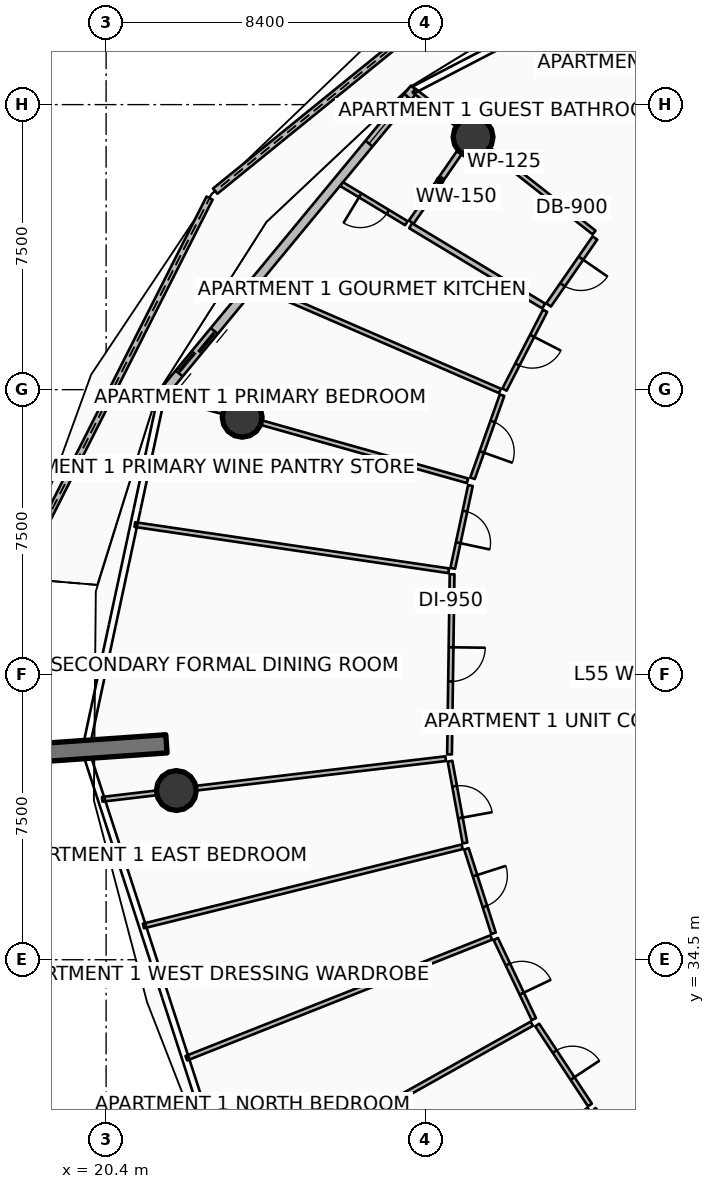
"""IFC4 building model, lengths in metres.
Left out: names, types, materials, properties, quantities, classifications, styles, units other than length and angle.
Written with IfcOpenShell. Run it as: python <this file> out.ifc"""

import sys

from ifc_helpers import new_model, si_unit, direction, frame, frame_2d, origin, origin_2d, place, context, subcontext, project, spatial, polyline, rectangle, circle, outline, extrude, element, fill, save


model = new_model("IFC4")
c1 = context("Model", 3, precision=1e-05, world=origin(), true_north=direction((0.0, 1.0)))
c2 = subcontext(c1, "Body", "Model", "MODEL_VIEW")
j1 = project(units=[si_unit("LENGTHUNIT", "METRE"), si_unit("PLANEANGLEUNIT", "RADIAN")], contexts=[c1])
p1 = place(None, origin())
s1 = spatial("IfcSite", under=j1, at=p1, CompositionType="ELEMENT")
p2 = place(p1, origin())
s2 = spatial("IfcBuilding", under=s1, at=p2, CompositionType="ELEMENT")
p3 = place(p2, frame((0.0, 0.0, 217.8)))
s3 = spatial("IfcBuildingStorey", under=s2, at=p3, CompositionType="ELEMENT", Elevation=217.8)
p4 = place(p3, frame((21.987, 40.181, 0.0), z_axis=(0.0, 0.0, 1.0), x_axis=(-0.997568676264, -0.069690287244, 0.0)))
e1 = element("IfcWall", 1, at=p4, inside=s3, PredefinedType="SOLIDWALL", context=c2, shape_type="SweptSolid", body=[
    extrude(rectangle(XDim=3.5, YDim=0.48, at=frame_2d((1.75, 0.0))), origin(), (0.0, 0.0, 1.0), 3.75),
])
for number, where, z_axis, x_axis in (
    (2, (30.056, 56.146, 0.0), (0.0, 0.0, 1.0), (1.0, 0.0, 0.0)),
    (3, (23.98, 48.774, 0.0), (0.0, 0.0, 1.0), (1.0, 0.0, 0.0)),
    (4, (22.248, 38.952, 0.0), (0.0, 0.0, 1.0), (1.0, 0.0, 0.0)),
):
    element("IfcColumn", number, at=place(p3, frame(where, z_axis=z_axis, x_axis=x_axis)), inside=s3, PredefinedType="COLUMN", context=c2, shape_type="SweptSolid", body=[
        extrude(circle(Radius=0.525, at=origin_2d()), origin(), (0.0, 0.0, 1.0), 3.5),
    ])
p5 = place(p3, frame((31.337, 61.271, 0.0), z_axis=(0.0, 0.0, 1.0), x_axis=(-0.776456761235, -0.630170530834, 0.0)))
e5 = element("IfcWall", 5, at=p5, inside=s3, PredefinedType="PARAPET", context=c2, shape_type="SweptSolid", body=[
    extrude(outline(polyline([(0.0, 0.0), (10.389, 0.0), (10.389, 1.148), (5.195, 1.127), (0.0, 1.224), (0.0, 0.0)])), frame((0.0, 0.09, 0.0), z_axis=(0.0, -1.0, 0.0), x_axis=(1.0, 0.0, 0.0)), (0.0, 0.0, 1.0), 0.18),
])
p6 = place(p3, frame((23.123, 54.541, 0.0), z_axis=(0.0, 0.0, 1.0), x_axis=(-0.451373731974, -0.892335001042, 0.0)))
e6 = element("IfcWall", 6, at=p6, inside=s3, PredefinedType="PARAPET", context=c2, shape_type="SweptSolid", body=[
    extrude(outline(polyline([(0.0, 0.0), (11.208, 0.0), (11.208, 1.483), (5.604, 1.284), (0.0, 1.148), (0.0, 0.0)])), frame((0.0, 0.09, 0.0), z_axis=(0.0, -1.0, 0.0), x_axis=(1.0, 0.0, 0.0)), (0.0, 0.0, 1.0), 0.18),
])
p7 = place(p3, frame((28.515, 57.424, 0.0), z_axis=(0.0, 0.0, 1.0), x_axis=(-0.636759394418, -0.771062561418, 0.0)))
e7 = element("IfcWall", 7, at=p7, inside=s3, PredefinedType="SOLIDWALL", context=c2, shape_type="SweptSolid", body=[
    extrude(rectangle(XDim=10.494, YDim=0.24, at=frame_2d((5.247, 0.0))), origin(), (0.0, 0.0, 1.0), 2.45),
])
p8 = place(p7, frame((8.274, 0.0, 0.0)))
e8 = element("IfcOpeningElement", 8, at=p8, cuts=e7, PredefinedType="OPENING", context=c2, shape_type="SweptSolid", body=[
    extrude(rectangle(XDim=1.45, YDim=2.15, at=frame_2d((0.725, 1.075))), frame((0.0, 0.13, 0.0), z_axis=(0.0, -1.0, 0.0), x_axis=(1.0, 0.0, 0.0)), (0.0, 0.0, 1.0), 0.26),
])
p9 = place(p7, frame((0.28, 0.0, 0.65)))
e9 = element("IfcOpeningElement", 9, at=p9, cuts=e7, PredefinedType="OPENING", context=c2, shape_type="SweptSolid", body=[
    extrude(rectangle(XDim=1.6, YDim=1.5, at=frame_2d((0.8, 0.75))), frame((0.0, 0.13, 0.0), z_axis=(0.0, -1.0, 0.0), x_axis=(1.0, 0.0, 0.0)), (0.0, 0.0, 1.0), 0.26),
])
p10 = place(p3, frame((41.113, 33.264, 0.0), z_axis=(0.0, 0.0, 1.0), x_axis=(-0.619089233189, -0.785320648748, 0.0)))
e10 = element("IfcWall", 10, at=p10, inside=s3, PredefinedType="PARTITIONING", context=c2, shape_type="SweptSolid", body=[
    extrude(rectangle(XDim=16.006, YDim=0.18, at=frame_2d((8.003, 0.0))), origin(), (0.0, 0.0, 1.0), 2.94),
])
p11 = place(p3, frame((33.241, 53.635, 0.0), z_axis=(0.0, 0.0, 1.0), x_axis=(-0.785321754625, 0.619087830371, 0.0)))
e11 = element("IfcWall", 11, at=p11, inside=s3, PredefinedType="PARTITIONING", context=c2, shape_type="SweptSolid", body=[
    extrude(rectangle(XDim=6.033, YDim=0.125, at=frame_2d((3.017, 0.0))), origin(), (0.0, 0.0, 1.0), 2.94),
])
p12 = place(p3, frame((33.262, 53.491, 0.0), z_axis=(0.0, 0.0, 1.0), x_axis=(-0.568919673568, -0.822393096413, 0.0)))
e12 = element("IfcWall", 12, at=p12, inside=s3, PredefinedType="PARTITIONING", context=c2, shape_type="SweptSolid", body=[
    extrude(rectangle(XDim=2.143, YDim=0.15, at=frame_2d((1.072, 0.0))), origin(), (0.0, 0.0, 1.0), 2.94),
])
p13 = place(p12, frame((0.646, 0.0, 0.0)))
e13 = element("IfcOpeningElement", 13, at=p13, cuts=e12, PredefinedType="OPENING", context=c2, shape_type="SweptSolid", body=[
    extrude(rectangle(XDim=0.85, YDim=2.06, at=frame_2d((0.425, 1.03))), frame((0.0, 0.085, 0.0), z_axis=(0.0, -1.0, 0.0), x_axis=(1.0, 0.0, 0.0)), (0.0, 0.0, 1.0), 0.17),
])
p14 = place(p3, frame((29.948, 56.104, 0.0), z_axis=(0.0, 0.0, 1.0), x_axis=(-0.568843740651, -0.822445620526, 0.0)))
e14 = element("IfcWall", 14, at=p14, inside=s3, PredefinedType="PARTITIONING", context=c2, shape_type="SweptSolid", body=[
    extrude(rectangle(XDim=2.669, YDim=0.15, at=frame_2d((1.335, 0.0))), origin(), (0.0, 0.0, 1.0), 2.94),
])
p15 = place(p3, frame((31.915, 51.701, 0.0), z_axis=(0.0, 0.0, 1.0), x_axis=(-0.856305556185, 0.516469548422, 0.0)))
e15 = element("IfcWall", 15, at=p15, inside=s3, PredefinedType="PARTITIONING", context=c2, shape_type="SweptSolid", body=[
    extrude(rectangle(XDim=4.09, YDim=0.15, at=frame_2d((2.045, 0.0))), origin(), (0.0, 0.0, 1.0), 2.94),
])
p16 = place(p3, frame((28.302, 53.881, 0.0), z_axis=(0.0, 0.0, 1.0), x_axis=(-0.856354175531, 0.516388929056, 0.0)))
e16 = element("IfcWall", 16, at=p16, inside=s3, PredefinedType="PARTITIONING", context=c2, shape_type="SweptSolid", body=[
    extrude(rectangle(XDim=1.99, YDim=0.125, at=frame_2d((0.995, 0.0))), origin(), (0.0, 0.0, 1.0), 2.94),
])
p17 = place(p16, frame((0.57, 0.0, 0.0)))
e17 = element("IfcOpeningElement", 17, at=p17, cuts=e16, PredefinedType="OPENING", context=c2, shape_type="SweptSolid", body=[
    extrude(rectangle(XDim=0.85, YDim=2.06, at=frame_2d((0.425, 1.03))), frame((0.0, 0.073, 0.0), z_axis=(0.0, -1.0, 0.0), x_axis=(1.0, 0.0, 0.0)), (0.0, 0.0, 1.0), 0.145),
])
p18 = place(p3, frame((30.764, 49.467, 0.0), z_axis=(0.0, 0.0, 1.0), x_axis=(-0.917605566125, 0.397492169755, 0.0)))
e18 = element("IfcWall", 18, at=p18, inside=s3, PredefinedType="PARTITIONING", context=c2, shape_type="SweptSolid", body=[
    extrude(rectangle(XDim=6.955, YDim=0.125, at=frame_2d((3.477, 0.0))), origin(), (0.0, 0.0, 1.0), 2.94),
])
p19 = place(p3, frame((31.951, 51.575, 0.0), z_axis=(0.0, 0.0, 1.0), x_axis=(-0.458029312051, -0.88893708962, 0.0)))
e19 = element("IfcWall", 19, at=p19, inside=s3, PredefinedType="PARTITIONING", context=c2, shape_type="SweptSolid", body=[
    extrude(rectangle(XDim=2.332, YDim=0.125, at=frame_2d((1.166, 0.0))), origin(), (0.0, 0.0, 1.0), 2.94),
])
p20 = place(p19, frame((0.741, 0.0, 0.0)))
e20 = element("IfcOpeningElement", 20, at=p20, cuts=e19, PredefinedType="OPENING", context=c2, shape_type="SweptSolid", body=[
    extrude(rectangle(XDim=0.85, YDim=2.06, at=frame_2d((0.425, 1.03))), frame((0.0, 0.073, 0.0), z_axis=(0.0, -1.0, 0.0), x_axis=(1.0, 0.0, 0.0)), (0.0, 0.0, 1.0), 0.145),
])
p21 = place(p3, frame((30.82, 49.356, 0.0), z_axis=(0.0, 0.0, 1.0), x_axis=(-0.335156966619, -0.942162304344, 0.0)))
e21 = element("IfcWall", 21, at=p21, inside=s3, PredefinedType="PARTITIONING", context=c2, shape_type="SweptSolid", body=[
    extrude(rectangle(XDim=2.322, YDim=0.125, at=frame_2d((1.161, 0.0))), origin(), (0.0, 0.0, 1.0), 2.94),
])
p22 = place(p21, frame((0.736, 0.0, 0.0)))
e22 = element("IfcOpeningElement", 22, at=p22, cuts=e21, PredefinedType="OPENING", context=c2, shape_type="SweptSolid", body=[
    extrude(rectangle(XDim=0.85, YDim=2.06, at=frame_2d((0.425, 1.03))), frame((0.0, 0.073, 0.0), z_axis=(0.0, -1.0, 0.0), x_axis=(1.0, 0.0, 0.0)), (0.0, 0.0, 1.0), 0.145),
])
p23 = place(p3, frame((29.912, 47.101, 0.0), z_axis=(0.0, 0.0, 1.0), x_axis=(-0.962449080254, 0.271462277156, 0.0)))
e23 = element("IfcWall", 23, at=p23, inside=s3, PredefinedType="PARTITIONING", context=c2, shape_type="SweptSolid", body=[
    extrude(rectangle(XDim=8.236, YDim=0.125, at=frame_2d((4.118, 0.0))), origin(), (0.0, 0.0, 1.0), 2.94),
])
p24 = place(p3, frame((29.416, 44.734, 0.0), z_axis=(0.0, 0.0, 1.0), x_axis=(-0.989347742189, 0.145571443031, 0.0)))
e24 = element("IfcWall", 24, at=p24, inside=s3, PredefinedType="PARTITIONING", context=c2, shape_type="SweptSolid", body=[
    extrude(rectangle(XDim=8.349, YDim=0.125, at=frame_2d((4.174, 0.0))), origin(), (0.0, 0.0, 1.0), 2.94),
])
p25 = place(p3, frame((29.987, 46.977, 0.0), z_axis=(0.0, 0.0, 1.0), x_axis=(-0.209004848165, -0.977914604372, 0.0)))
e25 = element("IfcWall", 25, at=p25, inside=s3, PredefinedType="PARTITIONING", context=c2, shape_type="SweptSolid", body=[
    extrude(rectangle(XDim=2.226, YDim=0.125, at=frame_2d((1.113, 0.0))), origin(), (0.0, 0.0, 1.0), 2.94),
])
p26 = place(p25, frame((0.688, 0.0, 0.0)))
e26 = element("IfcOpeningElement", 26, at=p26, cuts=e25, PredefinedType="OPENING", context=c2, shape_type="SweptSolid", body=[
    extrude(rectangle(XDim=0.85, YDim=2.06, at=frame_2d((0.425, 1.03))), frame((0.0, 0.073, 0.0), z_axis=(0.0, -1.0, 0.0), x_axis=(1.0, 0.0, 0.0)), (0.0, 0.0, 1.0), 0.145),
])
p27 = place(p3, frame((29.504, 44.641, 0.0), z_axis=(0.0, 0.0, 1.0), x_axis=(-0.014116482788, -0.999900357493, 0.0)))
e27 = element("IfcWall", 27, at=p27, inside=s3, PredefinedType="PARTITIONING", context=c2, shape_type="SweptSolid", body=[
    extrude(rectangle(XDim=4.739, YDim=0.125, at=frame_2d((2.369, 0.0))), origin(), (0.0, 0.0, 1.0), 2.94),
])
p28 = place(p27, frame((1.919, 0.0, 0.0)))
e28 = element("IfcOpeningElement", 28, at=p28, cuts=e27, PredefinedType="OPENING", context=c2, shape_type="SweptSolid", body=[
    extrude(rectangle(XDim=0.9, YDim=2.08, at=frame_2d((0.45, 1.04))), frame((0.0, 0.073, 0.0), z_axis=(0.0, -1.0, 0.0), x_axis=(1.0, 0.0, 0.0)), (0.0, 0.0, 1.0), 0.145),
])
p29 = place(p3, frame((29.336, 39.791, 0.0), z_axis=(0.0, 0.0, 1.0), x_axis=(-0.99306722244, -0.117547827356, 0.0)))
e29 = element("IfcWall", 29, at=p29, inside=s3, PredefinedType="PARTITIONING", context=c2, shape_type="SweptSolid", body=[
    extrude(rectangle(XDim=9.101, YDim=0.125, at=frame_2d((4.551, 0.0))), origin(), (0.0, 0.0, 1.0), 2.94),
])
p30 = place(p3, frame((29.77, 37.472, 0.0), z_axis=(0.0, 0.0, 1.0), x_axis=(-0.970505283608, -0.241079850857, 0.0)))
e30 = element("IfcWall", 30, at=p30, inside=s3, PredefinedType="PARTITIONING", context=c2, shape_type="SweptSolid", body=[
    extrude(rectangle(XDim=8.643, YDim=0.125, at=frame_2d((4.322, 0.0))), origin(), (0.0, 0.0, 1.0), 2.94),
])
p31 = place(p3, frame((30.535, 35.085, 0.0), z_axis=(0.0, 0.0, 1.0), x_axis=(-0.929776352491, -0.368124889607, 0.0)))
e31 = element("IfcWall", 31, at=p31, inside=s3, PredefinedType="PARTITIONING", context=c2, shape_type="SweptSolid", body=[
    extrude(rectangle(XDim=8.629, YDim=0.125, at=frame_2d((4.314, 0.0))), origin(), (0.0, 0.0, 1.0), 2.94),
])
p32 = place(p3, frame((29.45, 39.724, 0.0), z_axis=(0.0, 0.0, 1.0), x_axis=(0.179671023407, -0.98372675238, 0.0)))
e32 = element("IfcWall", 32, at=p32, inside=s3, PredefinedType="PARTITIONING", context=c2, shape_type="SweptSolid", body=[
    extrude(rectangle(XDim=2.188, YDim=0.125, at=frame_2d((1.094, 0.0))), origin(), (0.0, 0.0, 1.0), 2.94),
])
p33 = place(p32, frame((0.669, 0.0, 0.0)))
e33 = element("IfcOpeningElement", 33, at=p33, cuts=e32, PredefinedType="OPENING", context=c2, shape_type="SweptSolid", body=[
    extrude(rectangle(XDim=0.85, YDim=2.06, at=frame_2d((0.425, 1.03))), frame((0.0, 0.073, 0.0), z_axis=(0.0, -1.0, 0.0), x_axis=(1.0, 0.0, 0.0)), (0.0, 0.0, 1.0), 0.145),
])
p34 = place(p3, frame((29.882, 37.417, 0.0), z_axis=(0.0, 0.0, 1.0), x_axis=(0.305348810802, -0.952240570309, 0.0)))
e34 = element("IfcWall", 34, at=p34, inside=s3, PredefinedType="PARTITIONING", context=c2, shape_type="SweptSolid", body=[
    extrude(rectangle(XDim=2.334, YDim=0.125, at=frame_2d((1.167, 0.0))), origin(), (0.0, 0.0, 1.0), 2.94),
])
p35 = place(p34, frame((0.742, 0.0, 0.0)))
e35 = element("IfcOpeningElement", 35, at=p35, cuts=e34, PredefinedType="OPENING", context=c2, shape_type="SweptSolid", body=[
    extrude(rectangle(XDim=0.85, YDim=2.06, at=frame_2d((0.425, 1.03))), frame((0.0, 0.073, 0.0), z_axis=(0.0, -1.0, 0.0), x_axis=(1.0, 0.0, 0.0)), (0.0, 0.0, 1.0), 0.145),
])
p36 = place(p3, frame((30.653, 35.046, 0.0), z_axis=(0.0, 0.0, 1.0), x_axis=(0.429385363207, -0.903121370506, 0.0)))
e36 = element("IfcWall", 36, at=p36, inside=s3, PredefinedType="PARTITIONING", context=c2, shape_type="SweptSolid", body=[
    extrude(rectangle(XDim=2.334, YDim=0.125, at=frame_2d((1.167, 0.0))), origin(), (0.0, 0.0, 1.0), 2.94),
])
p37 = place(p36, frame((0.742, 0.0, 0.0)))
e37 = element("IfcOpeningElement", 37, at=p37, cuts=e36, PredefinedType="OPENING", context=c2, shape_type="SweptSolid", body=[
    extrude(rectangle(XDim=0.85, YDim=2.06, at=frame_2d((0.425, 1.03))), frame((0.0, 0.073, 0.0), z_axis=(0.0, -1.0, 0.0), x_axis=(1.0, 0.0, 0.0)), (0.0, 0.0, 1.0), 0.145),
])
p38 = place(p3, frame((31.602, 32.817, 0.0), z_axis=(0.0, 0.0, 1.0), x_axis=(-0.872494579812, -0.488623790047, 0.0)))
e38 = element("IfcWall", 38, at=p38, inside=s3, PredefinedType="PARTITIONING", context=c2, shape_type="SweptSolid", body=[
    extrude(rectangle(XDim=9.101, YDim=0.125, at=frame_2d((4.551, 0.0))), origin(), (0.0, 0.0, 1.0), 2.94),
])
p39 = place(p3, frame((33.104, 30.557, 0.0), z_axis=(0.0, 0.0, 1.0), x_axis=(-0.793029985802, -0.609182601212, 0.0)))
e39 = element("IfcWall", 39, at=p39, inside=s3, PredefinedType="PARTITIONING", context=c2, shape_type="SweptSolid", body=[
    extrude(rectangle(XDim=8.759, YDim=0.125, at=frame_2d((4.38, 0.0))), origin(), (0.0, 0.0, 1.0), 2.94),
])
p40 = place(p3, frame((31.745, 32.782, 0.0), z_axis=(0.0, 0.0, 1.0), x_axis=(0.550331787139, -0.834946060572, 0.0)))
e40 = element("IfcWall", 40, at=p40, inside=s3, PredefinedType="PARTITIONING", context=c2, shape_type="SweptSolid", body=[
    extrude(rectangle(XDim=2.519, YDim=0.125, at=frame_2d((1.26, 0.0))), origin(), (0.0, 0.0, 1.0), 2.94),
])
p41 = place(p40, frame((0.835, 0.0, 0.0)))
e41 = element("IfcOpeningElement", 41, at=p41, cuts=e40, PredefinedType="OPENING", context=c2, shape_type="SweptSolid", body=[
    extrude(rectangle(XDim=0.85, YDim=2.06, at=frame_2d((0.425, 1.03))), frame((0.0, 0.073, 0.0), z_axis=(0.0, -1.0, 0.0), x_axis=(1.0, 0.0, 0.0)), (0.0, 0.0, 1.0), 0.145),
])
p42 = place(p3, frame((33.231, 30.555, 0.0), z_axis=(0.0, 0.0, 1.0), x_axis=(0.702646714281, -0.711538892057, 0.0)))
e42 = element("IfcWall", 42, at=p42, inside=s3, PredefinedType="PARTITIONING", context=c2, shape_type="SweptSolid", body=[
    extrude(rectangle(XDim=4.448, YDim=0.125, at=frame_2d((2.224, 0.0))), origin(), (0.0, 0.0, 1.0), 2.94),
])
p43 = place(p42, frame((1.774, 0.0, 0.0)))
e43 = element("IfcOpeningElement", 43, at=p43, cuts=e42, PredefinedType="OPENING", context=c2, shape_type="SweptSolid", body=[
    extrude(rectangle(XDim=0.9, YDim=2.08, at=frame_2d((0.45, 1.04))), frame((0.0, 0.073, 0.0), z_axis=(0.0, -1.0, 0.0), x_axis=(1.0, 0.0, 0.0)), (0.0, 0.0, 1.0), 0.145),
])
p44 = place(p8, origin())
e44 = element("IfcDoor", 44, at=p44, inside=s3, OperationType="DOUBLE_DOOR_SLIDING", PredefinedType="DOOR", context=c2, shape_type="SweptSolid", body=[
    extrude(rectangle(XDim=1.45, YDim=2.15, at=frame_2d((0.725, 1.075))), frame((0.0, 0.025, 0.0), z_axis=(0.0, -1.0, 0.0), x_axis=(1.0, 0.0, 0.0)), (0.0, 0.0, 1.0), 0.05),
])
fill(e8, e44)
p45 = place(p9, origin())
e45 = element("IfcWindow", 45, at=p45, inside=s3, PartitioningType="SINGLE_PANEL", PredefinedType="WINDOW", context=c2, shape_type="SweptSolid", body=[
    extrude(rectangle(XDim=1.6, YDim=1.5, at=frame_2d((0.8, 0.75))), frame((0.0, 0.03, 0.0), z_axis=(0.0, -1.0, 0.0), x_axis=(1.0, 0.0, 0.0)), (0.0, 0.0, 1.0), 0.06),
])
fill(e9, e45)
p46 = place(p13, origin())
e46 = element("IfcDoor", 46, at=p46, inside=s3, OperationType="SINGLE_SWING_LEFT", PredefinedType="DOOR", context=c2, shape_type="SweptSolid", body=[
    extrude(rectangle(XDim=0.85, YDim=2.06, at=frame_2d((0.425, 1.03))), frame((0.0, 0.025, 0.0), z_axis=(0.0, -1.0, 0.0), x_axis=(1.0, 0.0, 0.0)), (0.0, 0.0, 1.0), 0.05),
])
fill(e13, e46)
p47 = place(p17, origin())
e47 = element("IfcDoor", 47, at=p47, inside=s3, OperationType="SINGLE_SWING_RIGHT", PredefinedType="DOOR", context=c2, shape_type="SweptSolid", body=[
    extrude(rectangle(XDim=0.85, YDim=2.06, at=frame_2d((0.425, 1.03))), frame((0.0, 0.025, 0.0), z_axis=(0.0, -1.0, 0.0), x_axis=(1.0, 0.0, 0.0)), (0.0, 0.0, 1.0), 0.05),
])
fill(e17, e47)
p48 = place(p20, origin())
e48 = element("IfcDoor", 48, at=p48, inside=s3, OperationType="SINGLE_SWING_LEFT", PredefinedType="DOOR", context=c2, shape_type="SweptSolid", body=[
    extrude(rectangle(XDim=0.85, YDim=2.06, at=frame_2d((0.425, 1.03))), frame((0.0, 0.025, 0.0), z_axis=(0.0, -1.0, 0.0), x_axis=(1.0, 0.0, 0.0)), (0.0, 0.0, 1.0), 0.05),
])
fill(e20, e48)
p49 = place(p22, origin())
e49 = element("IfcDoor", 49, at=p49, inside=s3, OperationType="SINGLE_SWING_RIGHT", PredefinedType="DOOR", context=c2, shape_type="SweptSolid", body=[
    extrude(rectangle(XDim=0.85, YDim=2.06, at=frame_2d((0.425, 1.03))), frame((0.0, 0.025, 0.0), z_axis=(0.0, -1.0, 0.0), x_axis=(1.0, 0.0, 0.0)), (0.0, 0.0, 1.0), 0.05),
])
fill(e22, e49)
p50 = place(p26, origin())
e50 = element("IfcDoor", 50, at=p50, inside=s3, OperationType="SINGLE_SWING_RIGHT", PredefinedType="DOOR", context=c2, shape_type="SweptSolid", body=[
    extrude(rectangle(XDim=0.85, YDim=2.06, at=frame_2d((0.425, 1.03))), frame((0.0, 0.025, 0.0), z_axis=(0.0, -1.0, 0.0), x_axis=(1.0, 0.0, 0.0)), (0.0, 0.0, 1.0), 0.05),
])
fill(e26, e50)
p51 = place(p28, origin())
e51 = element("IfcDoor", 51, at=p51, inside=s3, OperationType="SINGLE_SWING_LEFT", PredefinedType="DOOR", context=c2, shape_type="SweptSolid", body=[
    extrude(rectangle(XDim=0.9, YDim=2.08, at=frame_2d((0.45, 1.04))), frame((0.0, 0.025, 0.0), z_axis=(0.0, -1.0, 0.0), x_axis=(1.0, 0.0, 0.0)), (0.0, 0.0, 1.0), 0.05),
])
fill(e28, e51)
p52 = place(p33, origin())
e52 = element("IfcDoor", 52, at=p52, inside=s3, OperationType="SINGLE_SWING_RIGHT", PredefinedType="DOOR", context=c2, shape_type="SweptSolid", body=[
    extrude(rectangle(XDim=0.85, YDim=2.06, at=frame_2d((0.425, 1.03))), frame((0.0, 0.025, 0.0), z_axis=(0.0, -1.0, 0.0), x_axis=(1.0, 0.0, 0.0)), (0.0, 0.0, 1.0), 0.05),
])
fill(e33, e52)
p53 = place(p35, origin())
e53 = element("IfcDoor", 53, at=p53, inside=s3, OperationType="SINGLE_SWING_LEFT", PredefinedType="DOOR", context=c2, shape_type="SweptSolid", body=[
    extrude(rectangle(XDim=0.85, YDim=2.06, at=frame_2d((0.425, 1.03))), frame((0.0, 0.025, 0.0), z_axis=(0.0, -1.0, 0.0), x_axis=(1.0, 0.0, 0.0)), (0.0, 0.0, 1.0), 0.05),
])
fill(e35, e53)
p54 = place(p37, origin())
e54 = element("IfcDoor", 54, at=p54, inside=s3, OperationType="SINGLE_SWING_RIGHT", PredefinedType="DOOR", context=c2, shape_type="SweptSolid", body=[
    extrude(rectangle(XDim=0.85, YDim=2.06, at=frame_2d((0.425, 1.03))), frame((0.0, 0.025, 0.0), z_axis=(0.0, -1.0, 0.0), x_axis=(1.0, 0.0, 0.0)), (0.0, 0.0, 1.0), 0.05),
])
fill(e37, e54)
p55 = place(p41, origin())
e55 = element("IfcDoor", 55, at=p55, inside=s3, OperationType="SINGLE_SWING_RIGHT", PredefinedType="DOOR", context=c2, shape_type="SweptSolid", body=[
    extrude(rectangle(XDim=0.85, YDim=2.06, at=frame_2d((0.425, 1.03))), frame((0.0, 0.025, 0.0), z_axis=(0.0, -1.0, 0.0), x_axis=(1.0, 0.0, 0.0)), (0.0, 0.0, 1.0), 0.05),
])
fill(e41, e55)
save(model, sys.argv[1])
